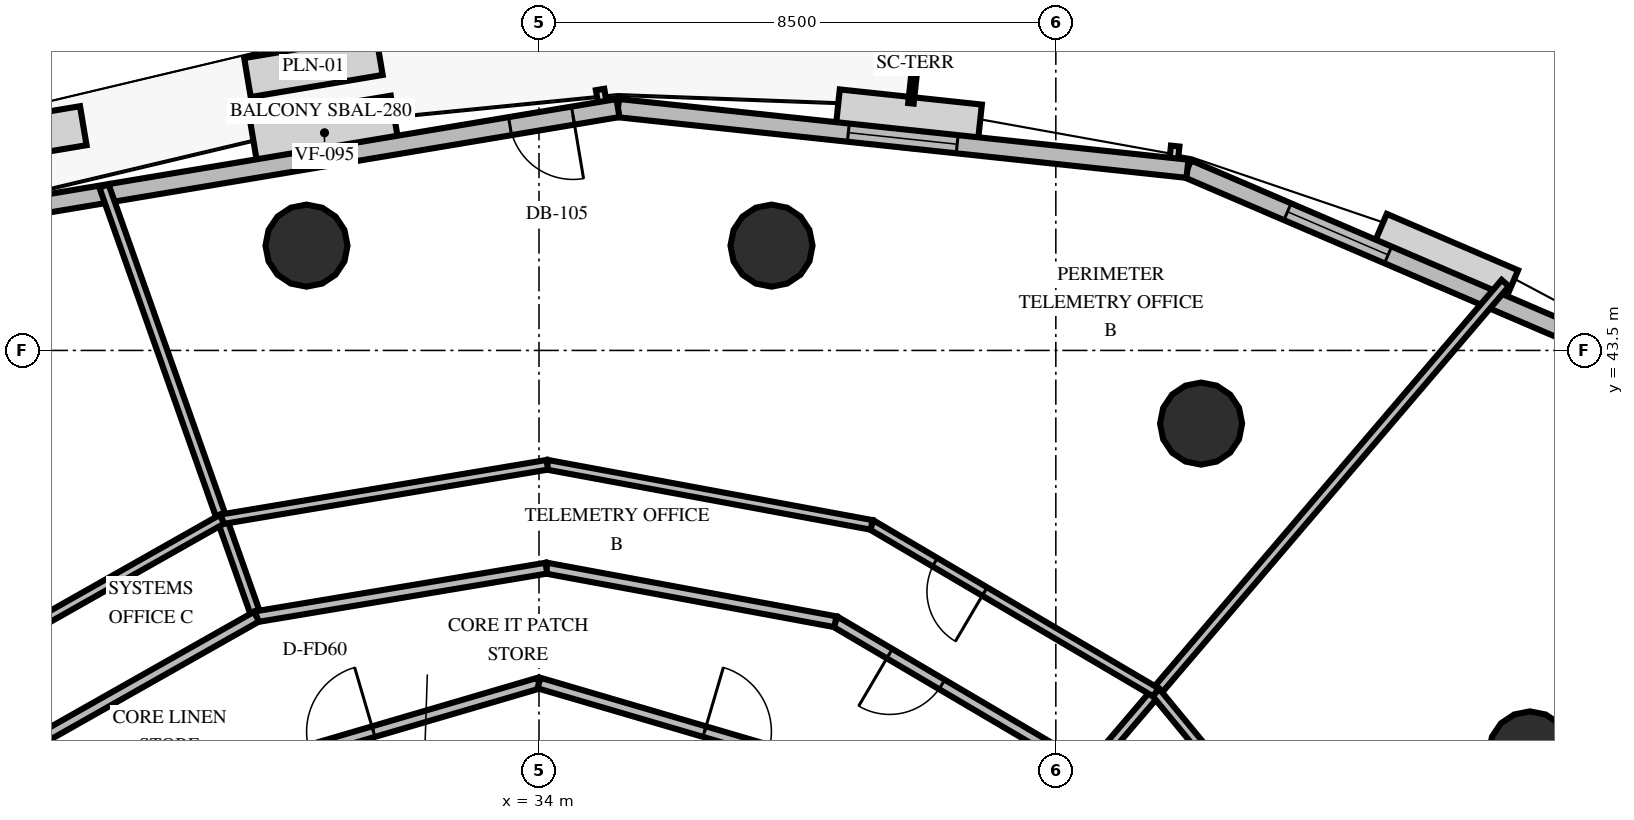
"""IFC4 building model, lengths in metres.
Left out: names, types, materials, properties, quantities, classifications, styles, units other than length and angle.
Written with IfcOpenShell. Run it as: python <this file> out.ifc"""

import sys

from ifc_helpers import new_model, si_unit, direction, frame, frame_2d, origin, origin_2d, place, context, subcontext, project, spatial, rectangle, circle, extrude, element, fill, save


model = new_model("IFC4")
c1 = context("Model", 3, precision=1e-05, world=origin(), true_north=direction((0.0, 1.0)))
c2 = subcontext(c1, "Body", "Model", "MODEL_VIEW")
j1 = project(units=[si_unit("LENGTHUNIT", "METRE"), si_unit("PLANEANGLEUNIT", "RADIAN")], contexts=[c1])
p1 = place(None, origin())
s1 = spatial("IfcSite", under=j1, at=p1, CompositionType="ELEMENT")
p2 = place(p1, origin())
s2 = spatial("IfcBuilding", under=s1, at=p2, CompositionType="ELEMENT")
p3 = place(p2, frame((0.0, 0.0, 72.0)))
s3 = spatial("IfcBuildingStorey", under=s2, at=p3, CompositionType="ELEMENT", Elevation=72.0)
for number, where, z_axis, x_axis in (
    (1, (50.297, 36.889, 0.0), (0.0, 0.0, 1.0), (1.0, 0.0, 0.0)),
    (2, (44.889, 42.297, 0.0), (0.0, 0.0, 1.0), (1.0, 0.0, 0.0)),
    (3, (37.824, 45.223, 0.0), (0.0, 0.0, 1.0), (1.0, 0.0, 0.0)),
    (4, (30.176, 45.223, 0.0), (0.0, 0.0, 1.0), (1.0, 0.0, 0.0)),
):
    element("IfcColumn", number, at=place(p3, frame(where, z_axis=z_axis, x_axis=x_axis)), inside=s3, PredefinedType="COLUMN", context=c2, shape_type="SweptSolid", body=[
        extrude(circle(Radius=0.675, at=origin_2d()), origin(), (0.0, 0.0, 1.0), 4.2),
    ])
p4 = place(p3, frame((52.744, 43.019, 0.0), z_axis=(0.0, 0.0, 1.0), x_axis=(-0.918880561622, 0.394535820267, 0.0)))
e5 = element("IfcWall", 5, at=p4, inside=s3, PredefinedType="SOLIDWALL", context=c2, shape_type="SweptSolid", body=[
    extrude(rectangle(XDim=8.792, YDim=0.3, at=frame_2d((4.396, 0.0))), origin(), (0.0, 0.0, 1.0), 3.0),
])
p5 = place(p4, frame((5.202, 0.0, 0.8)))
e6 = element("IfcOpeningElement", 6, at=p5, cuts=e5, PredefinedType="OPENING", context=c2, shape_type="SweptSolid", body=[
    extrude(rectangle(XDim=1.8, YDim=1.95, at=frame_2d((0.9, 0.975))), frame((0.0, 0.16, 0.0), z_axis=(0.0, -1.0, 0.0), x_axis=(1.0, 0.0, 0.0)), (0.0, 0.0, 1.0), 0.32),
])
p6 = place(p3, frame((44.665, 46.488, 0.0), z_axis=(0.0, 0.0, 1.0), x_axis=(-0.994369984689, 0.105963831328, 0.0)))
e7 = element("IfcWall", 7, at=p6, inside=s3, PredefinedType="SOLIDWALL", context=c2, shape_type="SweptSolid", body=[
    extrude(rectangle(XDim=9.419, YDim=0.3, at=frame_2d((4.709, 0.0))), origin(), (0.0, 0.0, 1.0), 3.0),
])
p7 = place(p6, frame((3.809, 0.0, 0.8)))
e8 = element("IfcOpeningElement", 8, at=p7, cuts=e7, PredefinedType="OPENING", context=c2, shape_type="SweptSolid", body=[
    extrude(rectangle(XDim=1.8, YDim=1.95, at=frame_2d((0.9, 0.975))), frame((0.0, 0.16, 0.0), z_axis=(0.0, -1.0, 0.0), x_axis=(1.0, 0.0, 0.0)), (0.0, 0.0, 1.0), 0.32),
])
p8 = place(p3, frame((35.299, 47.486, 0.0), z_axis=(0.0, 0.0, 1.0), x_axis=(-0.986285729655, -0.165046840259, 0.0)))
e9 = element("IfcWall", 9, at=p8, inside=s3, PredefinedType="SOLIDWALL", context=c2, shape_type="SweptSolid", body=[
    extrude(rectangle(XDim=9.655, YDim=0.3, at=frame_2d((4.827, 0.0))), origin(), (0.0, 0.0, 1.0), 3.0),
])
p9 = place(p8, frame((0.75, 0.0, 0.0)))
e10 = element("IfcOpeningElement", 10, at=p9, cuts=e9, PredefinedType="OPENING", context=c2, shape_type="SweptSolid", body=[
    extrude(rectangle(XDim=1.05, YDim=2.15, at=frame_2d((0.525, 1.075))), frame((0.0, 0.16, 0.0), z_axis=(0.0, -1.0, 0.0), x_axis=(1.0, 0.0, 0.0)), (0.0, 0.0, 1.0), 0.32),
])
p10 = place(p3, frame((27.5, 36.123, 0.0), z_axis=(0.0, 0.0, 1.0), x_axis=(0.959546654541, 0.281549671923, 0.0)))
e11 = element("IfcWall", 11, at=p10, inside=s3, PredefinedType="PARTITIONING", context=c2, shape_type="SweptSolid", body=[
    extrude(rectangle(XDim=6.774, YDim=0.18, at=frame_2d((3.387, 0.0))), origin(), (0.0, 0.0, 1.0), 3.0),
])
p11 = place(p10, frame((2.837, 0.0, 0.0)))
e12 = element("IfcOpeningElement", 12, at=p11, cuts=e11, PredefinedType="OPENING", context=c2, shape_type="SweptSolid", body=[
    extrude(rectangle(XDim=1.1, YDim=2.15, at=frame_2d((0.55, 1.075))), frame((0.0, 0.1, 0.0), z_axis=(0.0, -1.0, 0.0), x_axis=(1.0, 0.0, 0.0)), (0.0, 0.0, 1.0), 0.2),
])
p12 = place(p3, frame((34.0, 38.03, 0.0), z_axis=(0.0, 0.0, 1.0), x_axis=(0.959546654541, -0.281549671923, 0.0)))
e13 = element("IfcWall", 13, at=p12, inside=s3, PredefinedType="PARTITIONING", context=c2, shape_type="SweptSolid", body=[
    extrude(rectangle(XDim=6.774, YDim=0.18, at=frame_2d((3.387, 0.0))), origin(), (0.0, 0.0, 1.0), 3.0),
])
p13 = place(p12, frame((2.837, 0.0, 0.0)))
e14 = element("IfcOpeningElement", 14, at=p13, cuts=e13, PredefinedType="OPENING", context=c2, shape_type="SweptSolid", body=[
    extrude(rectangle(XDim=1.1, YDim=2.15, at=frame_2d((0.55, 1.075))), frame((0.0, 0.1, 0.0), z_axis=(0.0, -1.0, 0.0), x_axis=(1.0, 0.0, 0.0)), (0.0, 0.0, 1.0), 0.2),
])
p14 = place(p3, frame((43.04, 36.585, 0.0), z_axis=(0.0, 0.0, 1.0), x_axis=(0.649446826372, 0.760407009249, 0.0)))
e15 = element("IfcWall", 15, at=p14, inside=s3, PredefinedType="PARTITIONING", context=c2, shape_type="SweptSolid", body=[
    extrude(rectangle(XDim=10.55, YDim=0.16, at=frame_2d((5.275, 0.0))), origin(), (0.0, 0.0, 1.0), 3.0),
])
p15 = place(p3, frame((47.595, 33.692, 0.0), z_axis=(0.0, 0.0, 1.0), x_axis=(-0.636098388539, 0.771607957514, 0.0)))
e16 = element("IfcWall", 16, at=p15, inside=s3, PredefinedType="PARTITIONING", context=c2, shape_type="SweptSolid", body=[
    extrude(rectangle(XDim=5.425, YDim=0.16, at=frame_2d((2.712, 0.0))), origin(), (0.0, 0.0, 1.0), 3.0),
])
p16 = place(p3, frame((29.354, 39.122, 0.0), z_axis=(0.0, 0.0, 1.0), x_axis=(-0.333815866185, 0.942638301515, 0.0)))
e17 = element("IfcWall", 17, at=p16, inside=s3, PredefinedType="PARTITIONING", context=c2, shape_type="SweptSolid", body=[
    extrude(rectangle(XDim=7.514, YDim=0.16, at=frame_2d((3.757, 0.0))), origin(), (0.0, 0.0, 1.0), 3.0),
])
p17 = place(p3, frame((43.04, 36.585, 0.0), z_axis=(0.0, 0.0, 1.0), x_axis=(-0.861622469099, 0.507549722434, 0.0)))
e18 = element("IfcWall", 18, at=p17, inside=s3, PredefinedType="PARTITIONING", context=c2, shape_type="SweptSolid", body=[
    extrude(rectangle(XDim=4.834, YDim=0.18, at=frame_2d((2.417, 0.0))), origin(), (0.0, 0.0, 1.0), 3.0),
])
p18 = place(p17, frame((2.801, 0.0, 0.0)))
e19 = element("IfcOpeningElement", 19, at=p18, cuts=e18, PredefinedType="OPENING", context=c2, shape_type="SweptSolid", body=[
    extrude(rectangle(XDim=1.0, YDim=2.15, at=frame_2d((0.5, 1.075))), frame((0.0, 0.1, 0.0), z_axis=(0.0, -1.0, 0.0), x_axis=(1.0, 0.0, 0.0)), (0.0, 0.0, 1.0), 0.2),
])
p19 = place(p3, frame((38.875, 39.039, 0.0), z_axis=(0.0, 0.0, 1.0), x_axis=(-0.983259895059, 0.182208613322, 0.0)))
e20 = element("IfcWall", 20, at=p19, inside=s3, PredefinedType="PARTITIONING", context=c2, shape_type="SweptSolid", body=[
    extrude(rectangle(XDim=4.834, YDim=0.18, at=frame_2d((2.417, 0.0))), origin(), (0.0, 0.0, 1.0), 3.0),
])
p20 = place(p3, frame((34.122, 39.919, 0.0), z_axis=(0.0, 0.0, 1.0), x_axis=(-0.986287255142, -0.165037724004, 0.0)))
e21 = element("IfcWall", 21, at=p20, inside=s3, PredefinedType="PARTITIONING", context=c2, shape_type="SweptSolid", body=[
    extrude(rectangle(XDim=4.834, YDim=0.18, at=frame_2d((2.417, 0.0))), origin(), (0.0, 0.0, 1.0), 3.0),
])
p21 = place(p3, frame((44.144, 37.877, 0.0), z_axis=(0.0, 0.0, 1.0), x_axis=(-0.861614730764, 0.507562858896, 0.0)))
e22 = element("IfcWall", 22, at=p21, inside=s3, PredefinedType="PARTITIONING", context=c2, shape_type="SweptSolid", body=[
    extrude(rectangle(XDim=5.425, YDim=0.16, at=frame_2d((2.712, 0.0))), origin(), (0.0, 0.0, 1.0), 3.0),
])
p22 = place(p21, frame((3.266, 0.0, 0.0)))
e23 = element("IfcOpeningElement", 23, at=p22, cuts=e22, PredefinedType="OPENING", context=c2, shape_type="SweptSolid", body=[
    extrude(rectangle(XDim=0.95, YDim=2.15, at=frame_2d((0.475, 1.075))), frame((0.0, 0.09, 0.0), z_axis=(0.0, -1.0, 0.0), x_axis=(1.0, 0.0, 0.0)), (0.0, 0.0, 1.0), 0.18),
])
for number, where, z_axis, x_axis in (
    (24, (39.47, 40.631, 0.0), (0.0, 0.0, 1.0), (-0.983, 0.182, 0.0)),
    (25, (34.136, 41.619, 0.0), (0.0, 0.0, 1.0), (-0.986, -0.165, 0.0)),
):
    element("IfcWall", number, at=place(p3, frame(where, z_axis=z_axis, x_axis=x_axis)), inside=s3, PredefinedType="PARTITIONING", context=c2, shape_type="SweptSolid", body=[
        extrude(rectangle(XDim=5.425, YDim=0.16, at=frame_2d((2.712, 0.0))), origin(), (0.0, 0.0, 1.0), 3.0),
    ])
p23 = place(p3, frame((29.354, 39.122, 0.0), z_axis=(0.0, 0.0, 1.0), x_axis=(-0.870357726762, -0.492419970621, 0.0)))
e26 = element("IfcWall", 26, at=p23, inside=s3, PredefinedType="PARTITIONING", context=c2, shape_type="SweptSolid", body=[
    extrude(rectangle(XDim=4.834, YDim=0.18, at=frame_2d((2.417, 0.0))), origin(), (0.0, 0.0, 1.0), 3.0),
])
p24 = place(p3, frame((28.786, 40.724, 0.0), z_axis=(0.0, 0.0, 1.0), x_axis=(-0.870345661177, -0.492441296065, 0.0)))
e27 = element("IfcWall", 27, at=p24, inside=s3, PredefinedType="PARTITIONING", context=c2, shape_type="SweptSolid", body=[
    extrude(rectangle(XDim=5.425, YDim=0.16, at=frame_2d((2.712, 0.0))), origin(), (0.0, 0.0, 1.0), 3.0),
])
p25 = place(p5, origin())
e28 = element("IfcWindow", 28, at=p25, inside=s3, PartitioningType="SINGLE_PANEL", PredefinedType="WINDOW", context=c2, shape_type="SweptSolid", body=[
    extrude(rectangle(XDim=1.8, YDim=1.95, at=frame_2d((0.9, 0.975))), frame((0.0, 0.03, 0.0), z_axis=(0.0, -1.0, 0.0), x_axis=(1.0, 0.0, 0.0)), (0.0, 0.0, 1.0), 0.06),
])
fill(e6, e28)
p26 = place(p7, origin())
e29 = element("IfcWindow", 29, at=p26, inside=s3, PartitioningType="SINGLE_PANEL", PredefinedType="WINDOW", context=c2, shape_type="SweptSolid", body=[
    extrude(rectangle(XDim=1.8, YDim=1.95, at=frame_2d((0.9, 0.975))), frame((0.0, 0.03, 0.0), z_axis=(0.0, -1.0, 0.0), x_axis=(1.0, 0.0, 0.0)), (0.0, 0.0, 1.0), 0.06),
])
fill(e8, e29)
p27 = place(p9, origin())
e30 = element("IfcDoor", 30, at=p27, inside=s3, OperationType="SINGLE_SWING_LEFT", PredefinedType="DOOR", context=c2, shape_type="SweptSolid", body=[
    extrude(rectangle(XDim=1.05, YDim=2.15, at=frame_2d((0.525, 1.075))), frame((0.0, 0.025, 0.0), z_axis=(0.0, -1.0, 0.0), x_axis=(1.0, 0.0, 0.0)), (0.0, 0.0, 1.0), 0.05),
])
fill(e10, e30)
p28 = place(p11, origin())
e31 = element("IfcDoor", 31, at=p28, inside=s3, OperationType="SINGLE_SWING_RIGHT", PredefinedType="DOOR", context=c2, shape_type="SweptSolid", body=[
    extrude(rectangle(XDim=1.1, YDim=2.15, at=frame_2d((0.55, 1.075))), frame((0.0, 0.025, 0.0), z_axis=(0.0, -1.0, 0.0), x_axis=(1.0, 0.0, 0.0)), (0.0, 0.0, 1.0), 0.05),
])
fill(e12, e31)
p29 = place(p13, origin())
e32 = element("IfcDoor", 32, at=p29, inside=s3, OperationType="SINGLE_SWING_LEFT", PredefinedType="DOOR", context=c2, shape_type="SweptSolid", body=[
    extrude(rectangle(XDim=1.1, YDim=2.15, at=frame_2d((0.55, 1.075))), frame((0.0, 0.025, 0.0), z_axis=(0.0, -1.0, 0.0), x_axis=(1.0, 0.0, 0.0)), (0.0, 0.0, 1.0), 0.05),
])
fill(e14, e32)
p30 = place(p18, origin())
e33 = element("IfcDoor", 33, at=p30, inside=s3, OperationType="SINGLE_SWING_RIGHT", PredefinedType="DOOR", context=c2, shape_type="SweptSolid", body=[
    extrude(rectangle(XDim=1.0, YDim=2.15, at=frame_2d((0.5, 1.075))), frame((0.0, 0.025, 0.0), z_axis=(0.0, -1.0, 0.0), x_axis=(1.0, 0.0, 0.0)), (0.0, 0.0, 1.0), 0.05),
])
fill(e19, e33)
p31 = place(p22, origin())
e34 = element("IfcDoor", 34, at=p31, inside=s3, OperationType="SINGLE_SWING_LEFT", PredefinedType="DOOR", context=c2, shape_type="SweptSolid", body=[
    extrude(rectangle(XDim=0.95, YDim=2.15, at=frame_2d((0.475, 1.075))), frame((0.0, 0.025, 0.0), z_axis=(0.0, -1.0, 0.0), x_axis=(1.0, 0.0, 0.0)), (0.0, 0.0, 1.0), 0.05),
])
fill(e23, e34)
save(model, sys.argv[1])
